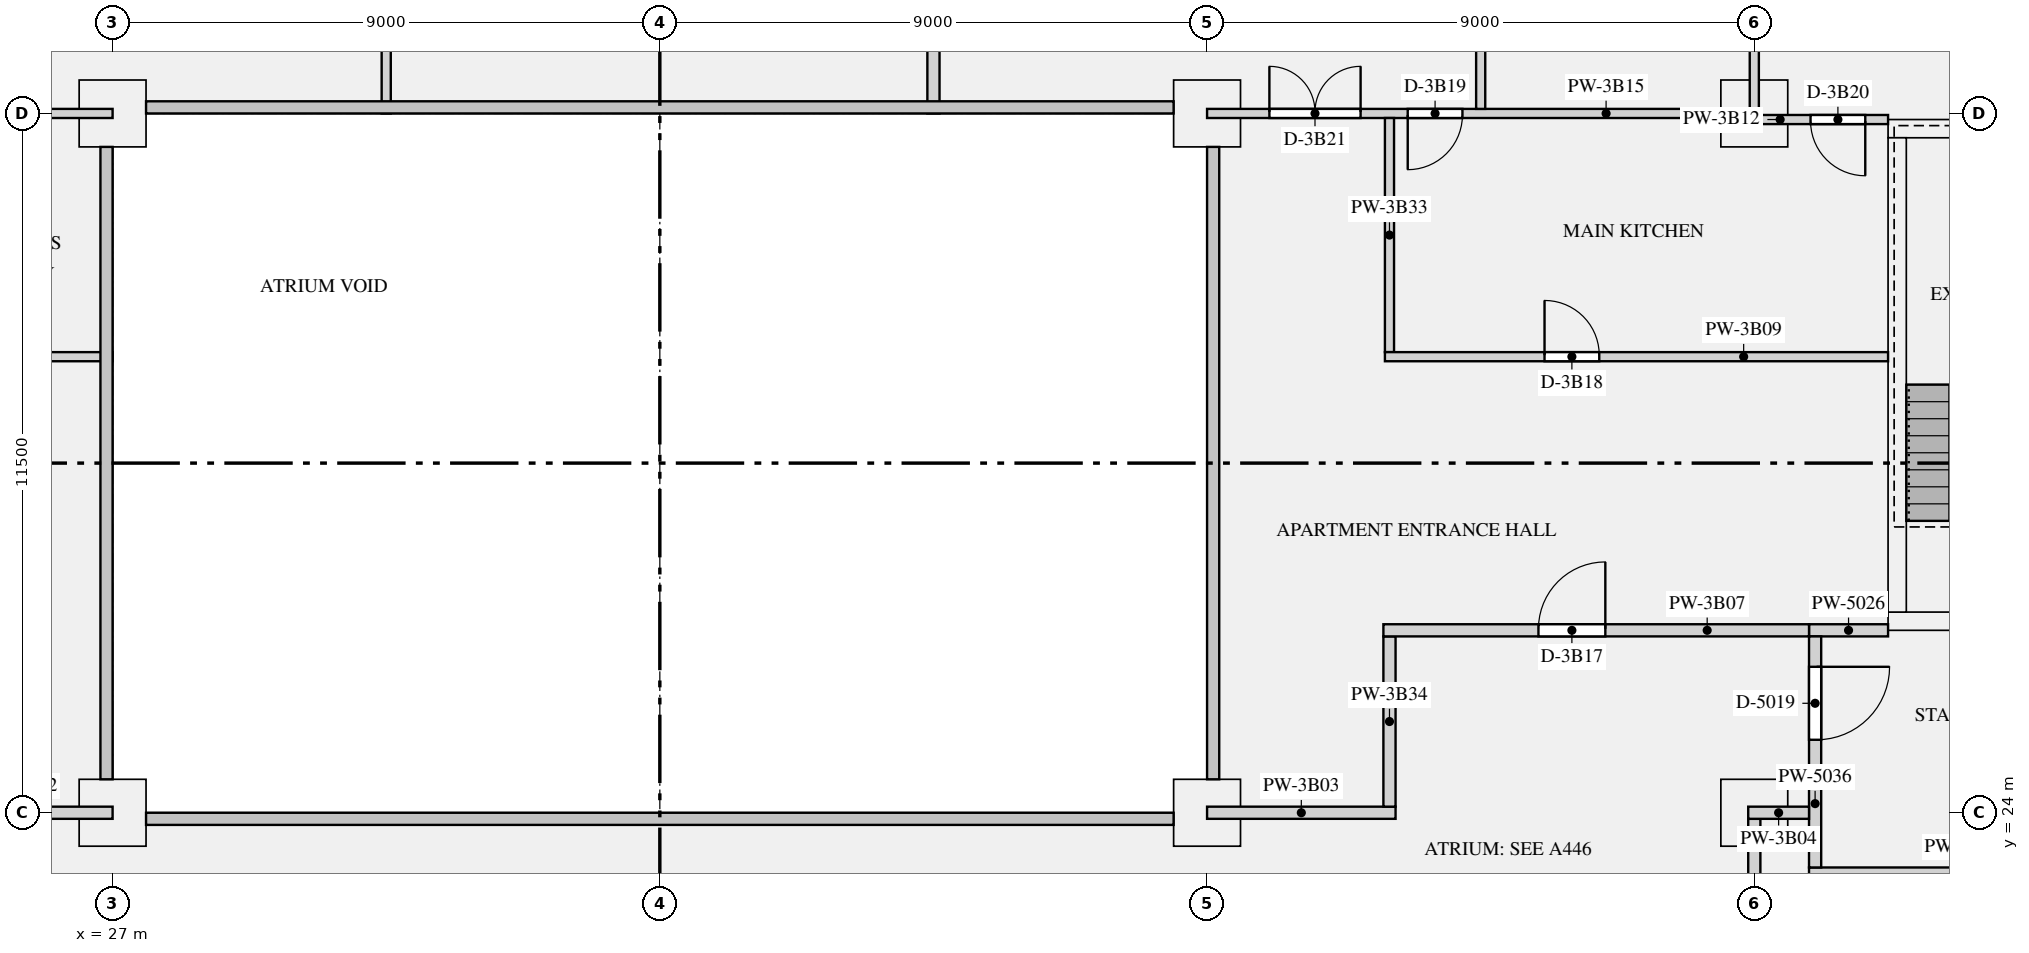
"""IFC4 building model, lengths in metres.
Left out: names, types, materials, properties, quantities, classifications, styles, units other than length and angle.
Written with IfcOpenShell. Run it as: python <this file> out.ifc"""

import sys

from ifc_helpers import new_model, si_unit, direction, frame, frame_2d, origin, origin_2d, place, context, subcontext, project, spatial, rectangle, extrude, element, fill, save


model = new_model("IFC4")
c1 = context("Model", 3, precision=1e-05, world=origin(), true_north=direction((0.0, 1.0)))
c2 = subcontext(c1, "Body", "Model", "MODEL_VIEW")
j1 = project(units=[si_unit("LENGTHUNIT", "METRE"), si_unit("PLANEANGLEUNIT", "RADIAN")], contexts=[c1])
p1 = place(None, origin())
s1 = spatial("IfcSite", under=j1, at=p1, CompositionType="ELEMENT")
p2 = place(p1, origin())
s2 = spatial("IfcBuilding", under=s1, at=p2, CompositionType="ELEMENT")
p3 = place(p2, frame((0.0, 0.0, 150.75)))
s3 = spatial("IfcBuildingStorey", under=s2, at=p3, CompositionType="ELEMENT", Elevation=150.75)
for number, where, z_axis, x_axis in (
    (1, (27.0, 24.0, 0.0), (0.0, 0.0, 1.0), (1.0, 0.0, 0.0)),
    (2, (45.0, 24.0, 0.0), (0.0, 0.0, 1.0), (1.0, 0.0, 0.0)),
    (3, (54.0, 24.0, 0.0), (0.0, 0.0, 1.0), (1.0, 0.0, 0.0)),
    (4, (27.0, 35.5, 0.0), (0.0, 0.0, 1.0), (1.0, 0.0, 0.0)),
    (5, (45.0, 35.5, 0.0), (0.0, 0.0, 1.0), (1.0, 0.0, 0.0)),
    (6, (54.0, 35.5, 0.0), (0.0, 0.0, 1.0), (1.0, 0.0, 0.0)),
):
    element("IfcColumn", number, at=place(p3, frame(where, z_axis=z_axis, x_axis=x_axis)), inside=s3, PredefinedType="COLUMN", context=c2, shape_type="SweptSolid", body=[
        extrude(rectangle(XDim=1.1, YDim=1.1, at=origin_2d()), origin(), (0.0, 0.0, 1.0), 3.15),
    ])
p4 = place(p3, frame((56.2, 27.15, 0.0), z_axis=(0.0, 0.0, 1.0), x_axis=(1.0, 0.0, 0.0)))
e7 = element("IfcWall", 7, at=p4, inside=s3, PredefinedType="SHEAR", context=c2, shape_type="SweptSolid", body=[
    extrude(rectangle(XDim=3.6, YDim=0.3, at=frame_2d((1.8, 0.0))), origin(), (0.0, 0.0, 1.0), 3.15),
])
p5 = place(p4, frame((1.25, 0.0, 0.0)))
e8 = element("IfcOpeningElement", 8, at=p5, cuts=e7, PredefinedType="OPENING", context=c2, shape_type="SweptSolid", body=[
    extrude(rectangle(XDim=1.1, YDim=2.1, at=frame_2d((0.55, 1.05))), frame((0.0, 0.16, 0.0), z_axis=(0.0, -1.0, 0.0), x_axis=(1.0, 0.0, 0.0)), (0.0, 0.0, 1.0), 0.32),
])
p6 = place(p3, frame((56.2, 35.25, 0.0), z_axis=(0.0, 0.0, 1.0), x_axis=(1.0, 0.0, 0.0)))
e9 = element("IfcWall", 9, at=p6, inside=s3, PredefinedType="SHEAR", context=c2, shape_type="SweptSolid", body=[
    extrude(rectangle(XDim=3.6, YDim=0.3, at=frame_2d((1.8, 0.0))), origin(), (0.0, 0.0, 1.0), 3.15),
])
p7 = place(p3, frame((56.35, 27.3, 0.0), z_axis=(0.0, 0.0, 1.0), x_axis=(0.0, 1.0, 0.0)))
e10 = element("IfcWall", 10, at=p7, inside=s3, PredefinedType="SHEAR", context=c2, shape_type="SweptSolid", body=[
    extrude(rectangle(XDim=7.8, YDim=0.3, at=frame_2d((3.9, 0.0))), origin(), (0.0, 0.0, 1.0), 3.15),
])
p8 = place(p3, frame((54.9, 23.0, 0.0), z_axis=(0.0, 0.0, 1.0), x_axis=(1.0, 0.0, 0.0)))
e11 = element("IfcWall", 11, at=p8, inside=s3, PredefinedType="PARTITIONING", context=c2, shape_type="SweptSolid", body=[
    extrude(rectangle(XDim=5.0, YDim=0.2, at=frame_2d((2.5, 0.0))), origin(), (0.0, 0.0, 1.0), 2.83),
])
p9 = place(p3, frame((54.9, 27.0, 0.0), z_axis=(0.0, 0.0, 1.0), x_axis=(1.0, 0.0, 0.0)))
e12 = element("IfcWall", 12, at=p9, inside=s3, PredefinedType="PARTITIONING", context=c2, shape_type="SweptSolid", body=[
    extrude(rectangle(XDim=1.3, YDim=0.2, at=frame_2d((0.65, 0.0))), origin(), (0.0, 0.0, 1.0), 2.83),
])
p10 = place(p3, frame((55.0, 23.1, 0.0), z_axis=(0.0, 0.0, 1.0), x_axis=(0.0, 1.0, 0.0)))
e13 = element("IfcWall", 13, at=p10, inside=s3, PredefinedType="PARTITIONING", context=c2, shape_type="SweptSolid", body=[
    extrude(rectangle(XDim=3.8, YDim=0.2, at=frame_2d((1.9, 0.0))), origin(), (0.0, 0.0, 1.0), 2.83),
])
p11 = place(p10, frame((2.1, 0.0, 0.0)))
e14 = element("IfcOpeningElement", 14, at=p11, cuts=e13, PredefinedType="OPENING", context=c2, shape_type="SweptSolid", body=[
    extrude(rectangle(XDim=1.2, YDim=2.1, at=frame_2d((0.6, 1.05))), frame((0.0, 0.11, 0.0), z_axis=(0.0, -1.0, 0.0), x_axis=(1.0, 0.0, 0.0)), (0.0, 0.0, 1.0), 0.22),
])
for number, where, z_axis, x_axis in (
    (15, (23.9, 24.0, 0.0), (0.0, 0.0, 1.0), (1.0, 0.0, 0.0)),
    (16, (45.0, 24.0, 0.0), (0.0, 0.0, 1.0), (1.0, 0.0, 0.0)),
):
    element("IfcWall", number, at=place(p3, frame(where, z_axis=z_axis, x_axis=x_axis)), inside=s3, PredefinedType="PARTITIONING", context=c2, shape_type="SweptSolid", body=[
        extrude(rectangle(XDim=3.1, YDim=0.2, at=frame_2d((1.55, 0.0))), origin(), (0.0, 0.0, 1.0), 2.83),
    ])
p12 = place(p3, frame((53.9, 24.0, 0.0), z_axis=(0.0, 0.0, 1.0), x_axis=(1.0, 0.0, 0.0)))
e17 = element("IfcWall", 17, at=p12, inside=s3, PredefinedType="PARTITIONING", context=c2, shape_type="SweptSolid", body=[
    extrude(rectangle(XDim=1.0, YDim=0.2, at=frame_2d((0.5, 0.0))), origin(), (0.0, 0.0, 1.0), 2.83),
])
p13 = place(p3, frame((47.9, 27.0, 0.0), z_axis=(0.0, 0.0, 1.0), x_axis=(1.0, 0.0, 0.0)))
e18 = element("IfcWall", 18, at=p13, inside=s3, PredefinedType="PARTITIONING", context=c2, shape_type="SweptSolid", body=[
    extrude(rectangle(XDim=7.0, YDim=0.2, at=frame_2d((3.5, 0.0))), origin(), (0.0, 0.0, 1.0), 2.83),
])
p14 = place(p13, frame((2.55, 0.0, 0.0)))
e19 = element("IfcOpeningElement", 19, at=p14, cuts=e18, PredefinedType="OPENING", context=c2, shape_type="SweptSolid", body=[
    extrude(rectangle(XDim=1.1, YDim=2.1, at=frame_2d((0.55, 1.05))), frame((0.0, 0.11, 0.0), z_axis=(0.0, -1.0, 0.0), x_axis=(1.0, 0.0, 0.0)), (0.0, 0.0, 1.0), 0.22),
])
p15 = place(p3, frame((15.8, 31.5, 0.0), z_axis=(0.0, 0.0, 1.0), x_axis=(1.0, 0.0, 0.0)))
e20 = element("IfcWall", 20, at=p15, inside=s3, PredefinedType="PARTITIONING", context=c2, shape_type="SweptSolid", body=[
    extrude(rectangle(XDim=11.2, YDim=0.15, at=frame_2d((5.6, 0.0))), origin(), (0.0, 0.0, 1.0), 2.83),
])
p16 = place(p15, frame((2.9, 0.0, 0.0)))
e21 = element("IfcOpeningElement", 21, at=p16, cuts=e20, PredefinedType="OPENING", context=c2, shape_type="SweptSolid", body=[
    extrude(rectangle(XDim=0.9, YDim=2.1, at=frame_2d((0.45, 1.05))), frame((0.0, 0.085, 0.0), z_axis=(0.0, -1.0, 0.0), x_axis=(1.0, 0.0, 0.0)), (0.0, 0.0, 1.0), 0.17),
])
p17 = place(p3, frame((47.925, 31.5, 0.0), z_axis=(0.0, 0.0, 1.0), x_axis=(1.0, 0.0, 0.0)))
e22 = element("IfcWall", 22, at=p17, inside=s3, PredefinedType="PARTITIONING", context=c2, shape_type="SweptSolid", body=[
    extrude(rectangle(XDim=8.275, YDim=0.15, at=frame_2d((4.137, 0.0))), origin(), (0.0, 0.0, 1.0), 2.83),
])
p18 = place(p17, frame((2.625, 0.0, 0.0)))
e23 = element("IfcOpeningElement", 23, at=p18, cuts=e22, PredefinedType="OPENING", context=c2, shape_type="SweptSolid", body=[
    extrude(rectangle(XDim=0.9, YDim=2.1, at=frame_2d((0.45, 1.05))), frame((0.0, 0.085, 0.0), z_axis=(0.0, -1.0, 0.0), x_axis=(1.0, 0.0, 0.0)), (0.0, 0.0, 1.0), 0.17),
])
p19 = place(p3, frame((53.925, 35.4, 0.0), z_axis=(0.0, 0.0, 1.0), x_axis=(1.0, 0.0, 0.0)))
e24 = element("IfcWall", 24, at=p19, inside=s3, PredefinedType="PARTITIONING", context=c2, shape_type="SweptSolid", body=[
    extrude(rectangle(XDim=2.275, YDim=0.15, at=frame_2d((1.137, 0.0))), origin(), (0.0, 0.0, 1.0), 2.83),
])
p20 = place(p19, frame((1.0, 0.0, 0.0)))
e25 = element("IfcOpeningElement", 25, at=p20, cuts=e24, PredefinedType="OPENING", context=c2, shape_type="SweptSolid", body=[
    extrude(rectangle(XDim=0.9, YDim=2.1, at=frame_2d((0.45, 1.05))), frame((0.0, 0.085, 0.0), z_axis=(0.0, -1.0, 0.0), x_axis=(1.0, 0.0, 0.0)), (0.0, 0.0, 1.0), 0.17),
])
p21 = place(p3, frame((22.575, 35.5, 0.0), z_axis=(0.0, 0.0, 1.0), x_axis=(1.0, 0.0, 0.0)))
e26 = element("IfcWall", 26, at=p21, inside=s3, PredefinedType="PARTITIONING", context=c2, shape_type="SweptSolid", body=[
    extrude(rectangle(XDim=4.425, YDim=0.15, at=frame_2d((2.212, 0.0))), origin(), (0.0, 0.0, 1.0), 2.83),
])
p22 = place(p3, frame((45.0, 35.5, 0.0), z_axis=(0.0, 0.0, 1.0), x_axis=(1.0, 0.0, 0.0)))
e27 = element("IfcWall", 27, at=p22, inside=s3, PredefinedType="PARTITIONING", context=c2, shape_type="SweptSolid", body=[
    extrude(rectangle(XDim=8.925, YDim=0.15, at=frame_2d((4.462, 0.0))), origin(), (0.0, 0.0, 1.0), 2.83),
])
p23 = place(p22, frame((3.3, 0.0, 0.0)))
e28 = element("IfcOpeningElement", 28, at=p23, cuts=e27, PredefinedType="OPENING", context=c2, shape_type="SweptSolid", body=[
    extrude(rectangle(XDim=0.9, YDim=2.1, at=frame_2d((0.45, 1.05))), frame((0.0, 0.085, 0.0), z_axis=(0.0, -1.0, 0.0), x_axis=(1.0, 0.0, 0.0)), (0.0, 0.0, 1.0), 0.17),
])
p24 = place(p22, frame((1.025, 0.0, 0.0)))
e29 = element("IfcOpeningElement", 29, at=p24, cuts=e27, PredefinedType="OPENING", context=c2, shape_type="SweptSolid", body=[
    extrude(rectangle(XDim=1.5, YDim=2.1, at=frame_2d((0.75, 1.05))), frame((0.0, 0.085, 0.0), z_axis=(0.0, -1.0, 0.0), x_axis=(1.0, 0.0, 0.0)), (0.0, 0.0, 1.0), 0.17),
])
p25 = place(p3, frame((54.0, 35.475, 0.0), z_axis=(0.0, 0.0, 1.0), x_axis=(0.0, 1.0, 0.0)))
e30 = element("IfcWall", 30, at=p25, inside=s3, PredefinedType="PARTITIONING", context=c2, shape_type="SweptSolid", body=[
    extrude(rectangle(XDim=7.325, YDim=0.15, at=frame_2d((3.663, 0.0))), origin(), (0.0, 0.0, 1.0), 2.83),
])
p26 = place(p25, frame((3.575, 0.0, 0.0)))
e31 = element("IfcOpeningElement", 31, at=p26, cuts=e30, PredefinedType="OPENING", context=c2, shape_type="SweptSolid", body=[
    extrude(rectangle(XDim=0.9, YDim=2.1, at=frame_2d((0.45, 1.05))), frame((0.0, 0.085, 0.0), z_axis=(0.0, -1.0, 0.0), x_axis=(1.0, 0.0, 0.0)), (0.0, 0.0, 1.0), 0.17),
])
p27 = place(p3, frame((54.0, 16.1, 0.0), z_axis=(0.0, 0.0, 1.0), x_axis=(0.0, 1.0, 0.0)))
e32 = element("IfcWall", 32, at=p27, inside=s3, PredefinedType="PARTITIONING", context=c2, shape_type="SweptSolid", body=[
    extrude(rectangle(XDim=7.8, YDim=0.2, at=frame_2d((3.9, 0.0))), origin(), (0.0, 0.0, 1.0), 2.83),
])
p28 = place(p3, frame((48.0, 31.575, 0.0), z_axis=(0.0, 0.0, 1.0), x_axis=(0.0, 1.0, 0.0)))
e33 = element("IfcWall", 33, at=p28, inside=s3, PredefinedType="PARTITIONING", context=c2, shape_type="SweptSolid", body=[
    extrude(rectangle(XDim=3.85, YDim=0.15, at=frame_2d((1.925, 0.0))), origin(), (0.0, 0.0, 1.0), 2.83),
])
p29 = place(p3, frame((48.0, 24.1, 0.0), z_axis=(0.0, 0.0, 1.0), x_axis=(0.0, 1.0, 0.0)))
e34 = element("IfcWall", 34, at=p29, inside=s3, PredefinedType="PARTITIONING", context=c2, shape_type="SweptSolid", body=[
    extrude(rectangle(XDim=2.8, YDim=0.2, at=frame_2d((1.4, 0.0))), origin(), (0.0, 0.0, 1.0), 2.83),
])
p30 = place(p3, frame((31.5, 35.5, 0.0), z_axis=(0.0, 0.0, 1.0), x_axis=(0.0, 1.0, 0.0)))
e35 = element("IfcWall", 35, at=p30, inside=s3, PredefinedType="PARTITIONING", context=c2, shape_type="SweptSolid", body=[
    extrude(rectangle(XDim=7.3, YDim=0.15, at=frame_2d((3.65, 0.0))), origin(), (0.0, 0.0, 1.0), 2.83),
])
p31 = place(p30, frame((3.275, 0.0, 0.0)))
e36 = element("IfcOpeningElement", 36, at=p31, cuts=e35, PredefinedType="OPENING", context=c2, shape_type="SweptSolid", body=[
    extrude(rectangle(XDim=0.9, YDim=2.1, at=frame_2d((0.45, 1.05))), frame((0.0, 0.085, 0.0), z_axis=(0.0, -1.0, 0.0), x_axis=(1.0, 0.0, 0.0)), (0.0, 0.0, 1.0), 0.17),
])
p32 = place(p3, frame((40.5, 35.5, 0.0), z_axis=(0.0, 0.0, 1.0), x_axis=(0.0, 1.0, 0.0)))
e37 = element("IfcWall", 37, at=p32, inside=s3, PredefinedType="PARTITIONING", context=c2, shape_type="SweptSolid", body=[
    extrude(rectangle(XDim=7.3, YDim=0.2, at=frame_2d((3.65, 0.0))), origin(), (0.0, 0.0, 1.0), 2.83),
])
p33 = place(p3, frame((49.5, 35.575, 0.0), z_axis=(0.0, 0.0, 1.0), x_axis=(0.0, 1.0, 0.0)))
e38 = element("IfcWall", 38, at=p33, inside=s3, PredefinedType="PARTITIONING", context=c2, shape_type="SweptSolid", body=[
    extrude(rectangle(XDim=7.225, YDim=0.15, at=frame_2d((3.613, 0.0))), origin(), (0.0, 0.0, 1.0), 2.83),
])
p34 = place(p33, frame((3.2, 0.0, 0.0)))
e39 = element("IfcOpeningElement", 39, at=p34, cuts=e38, PredefinedType="OPENING", context=c2, shape_type="SweptSolid", body=[
    extrude(rectangle(XDim=0.9, YDim=2.1, at=frame_2d((0.45, 1.05))), frame((0.0, 0.085, 0.0), z_axis=(0.0, -1.0, 0.0), x_axis=(1.0, 0.0, 0.0)), (0.0, 0.0, 1.0), 0.17),
])
p35 = place(p11, frame((1.2, 0.0, 0.0), z_axis=(0.0, 0.0, 1.0), x_axis=(-1.0, 0.0, 0.0)))
e40 = element("IfcDoor", 40, at=p35, inside=s3, OperationType="SINGLE_SWING_LEFT", PredefinedType="DOOR", context=c2, shape_type="SweptSolid", body=[
    extrude(rectangle(XDim=1.2, YDim=2.1, at=frame_2d((0.6, 1.05))), frame((0.0, 0.025, 0.0), z_axis=(0.0, -1.0, 0.0), x_axis=(1.0, 0.0, 0.0)), (0.0, 0.0, 1.0), 0.05),
])
fill(e14, e40)
p36 = place(p14, origin())
e41 = element("IfcDoor", 41, at=p36, inside=s3, OperationType="SINGLE_SWING_RIGHT", PredefinedType="DOOR", context=c2, shape_type="SweptSolid", body=[
    extrude(rectangle(XDim=1.1, YDim=2.1, at=frame_2d((0.55, 1.05))), frame((0.0, 0.025, 0.0), z_axis=(0.0, -1.0, 0.0), x_axis=(1.0, 0.0, 0.0)), (0.0, 0.0, 1.0), 0.05),
])
fill(e19, e41)
p37 = place(p18, origin())
e42 = element("IfcDoor", 42, at=p37, inside=s3, OperationType="SINGLE_SWING_LEFT", PredefinedType="DOOR", context=c2, shape_type="SweptSolid", body=[
    extrude(rectangle(XDim=0.9, YDim=2.1, at=frame_2d((0.45, 1.05))), frame((0.0, 0.025, 0.0), z_axis=(0.0, -1.0, 0.0), x_axis=(1.0, 0.0, 0.0)), (0.0, 0.0, 1.0), 0.05),
])
fill(e23, e42)
p38 = place(p23, frame((0.9, 0.0, 0.0), z_axis=(0.0, 0.0, 1.0), x_axis=(-1.0, 0.0, 0.0)))
e43 = element("IfcDoor", 43, at=p38, inside=s3, OperationType="SINGLE_SWING_RIGHT", PredefinedType="DOOR", context=c2, shape_type="SweptSolid", body=[
    extrude(rectangle(XDim=0.9, YDim=2.1, at=frame_2d((0.45, 1.05))), frame((0.0, 0.025, 0.0), z_axis=(0.0, -1.0, 0.0), x_axis=(1.0, 0.0, 0.0)), (0.0, 0.0, 1.0), 0.05),
])
fill(e28, e43)
p39 = place(p20, frame((0.9, 0.0, 0.0), z_axis=(0.0, 0.0, 1.0), x_axis=(-1.0, 0.0, 0.0)))
e44 = element("IfcDoor", 44, at=p39, inside=s3, OperationType="SINGLE_SWING_LEFT", PredefinedType="DOOR", context=c2, shape_type="SweptSolid", body=[
    extrude(rectangle(XDim=0.9, YDim=2.1, at=frame_2d((0.45, 1.05))), frame((0.0, 0.025, 0.0), z_axis=(0.0, -1.0, 0.0), x_axis=(1.0, 0.0, 0.0)), (0.0, 0.0, 1.0), 0.05),
])
fill(e25, e44)
p40 = place(p24, origin())
e45 = element("IfcDoor", 45, at=p40, inside=s3, OperationType="DOUBLE_DOOR_SINGLE_SWING", PredefinedType="DOOR", context=c2, shape_type="SweptSolid", body=[
    extrude(rectangle(XDim=1.5, YDim=2.1, at=frame_2d((0.75, 1.05))), frame((0.0, 0.025, 0.0), z_axis=(0.0, -1.0, 0.0), x_axis=(1.0, 0.0, 0.0)), (0.0, 0.0, 1.0), 0.05),
])
fill(e29, e45)
save(model, sys.argv[1])
